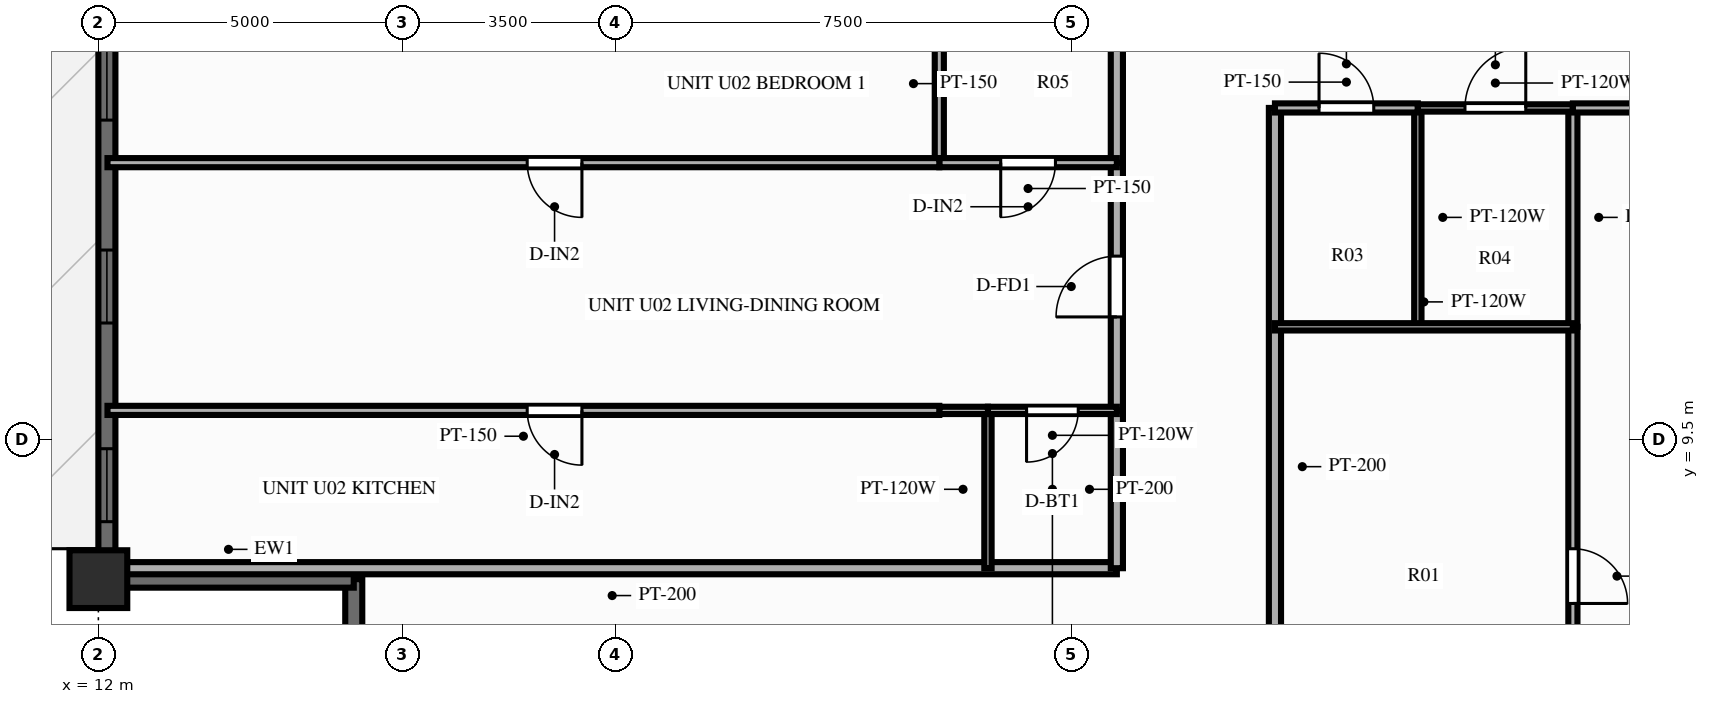
"""IFC4 building model, lengths in metres.
Left out: names, types, materials, properties, quantities, classifications, styles, units other than length and angle.
Written with IfcOpenShell. Run it as: python <this file> out.ifc"""

import sys

from ifc_helpers import new_model, si_unit, direction, frame, frame_2d, origin, origin_2d, place, context, subcontext, project, spatial, rectangle, extrude, source, transform, mapped, element, fill, save


model = new_model("IFC4")
c1 = context("Model", 3, precision=1e-05, world=origin(), true_north=direction((0.0, 1.0)))
c2 = subcontext(c1, "Body", "Model", "MODEL_VIEW")
j1 = project(units=[si_unit("LENGTHUNIT", "METRE"), si_unit("PLANEANGLEUNIT", "RADIAN")], contexts=[c1])
p1 = place(None, origin())
s1 = spatial("IfcSite", under=j1, at=p1, CompositionType="ELEMENT")
p2 = place(p1, origin())
s2 = spatial("IfcBuilding", under=s1, at=p2, CompositionType="ELEMENT")
p3 = place(p2, frame((0.0, 0.0, 138.75)))
s3 = spatial("IfcBuildingStorey", under=s2, at=p3, CompositionType="ELEMENT", Elevation=138.75)
m1 = source(origin(), c2, "Body", "SweptSolid", [
    extrude(rectangle(XDim=0.95, YDim=0.95, at=origin_2d()), origin(), (0.0, 0.0, 1.0), 3.0),
])
p4 = place(p3, frame((12.0, 7.2, 0.0), z_axis=(0.0, 0.0, 1.0), x_axis=(1.0, 0.0, 0.0)))
e1 = element("IfcColumn", 1, at=p4, inside=s3, PredefinedType="COLUMN", context=c2, shape_type="MappedRepresentation", body=[
    mapped(m1, transform((0.0, 0.0, 0.0), scale=1.0)),
])
p5 = place(p3, frame((12.14, 7.2, 0.0), z_axis=(0.0, 0.0, 1.0), x_axis=(0.0, 1.0, 0.0)))
e2 = element("IfcWall", 2, at=p5, inside=s3, PredefinedType="SOLIDWALL", context=c2, shape_type="SweptSolid", body=[
    extrude(rectangle(XDim=39.6, YDim=0.28, at=frame_2d((19.8, 0.0))), origin(), (0.0, 0.0, 1.0), 2.28),
])
p6 = place(p5, frame((0.945, 0.0, 0.25)))
e3 = element("IfcOpeningElement", 3, at=p6, cuts=e2, PredefinedType="OPENING", context=c2, shape_type="SweptSolid", body=[
    extrude(rectangle(XDim=1.2, YDim=1.5, at=frame_2d((0.6, 0.75))), frame((0.0, 0.152, 0.0), z_axis=(0.0, -1.0, 0.0), x_axis=(1.0, 0.0, 0.0)), (0.0, 0.0, 1.0), 0.304),
])
p7 = place(p5, frame((4.213, 0.0, 0.25)))
e4 = element("IfcOpeningElement", 4, at=p7, cuts=e2, PredefinedType="OPENING", context=c2, shape_type="SweptSolid", body=[
    extrude(rectangle(XDim=1.2, YDim=1.5, at=frame_2d((0.6, 0.75))), frame((0.0, 0.152, 0.0), z_axis=(0.0, -1.0, 0.0), x_axis=(1.0, 0.0, 0.0)), (0.0, 0.0, 1.0), 0.304),
])
p8 = place(p5, frame((7.55, 0.0, 0.25)))
e5 = element("IfcOpeningElement", 5, at=p8, cuts=e2, PredefinedType="OPENING", context=c2, shape_type="SweptSolid", body=[
    extrude(rectangle(XDim=1.2, YDim=1.5, at=frame_2d((0.6, 0.75))), frame((0.0, 0.152, 0.0), z_axis=(0.0, -1.0, 0.0), x_axis=(1.0, 0.0, 0.0)), (0.0, 0.0, 1.0), 0.304),
])
p9 = place(p5, frame((13.483, 0.0, 0.25)))
e6 = element("IfcOpeningElement", 6, at=p9, cuts=e2, PredefinedType="OPENING", context=c2, shape_type="SweptSolid", body=[
    extrude(rectangle(XDim=1.2, YDim=1.5, at=frame_2d((0.6, 0.75))), frame((0.0, 0.152, 0.0), z_axis=(0.0, -1.0, 0.0), x_axis=(1.0, 0.0, 0.0)), (0.0, 0.0, 1.0), 0.304),
])
p10 = place(p5, frame((16.82, 0.0, 0.25)))
e7 = element("IfcOpeningElement", 7, at=p10, cuts=e2, PredefinedType="OPENING", context=c2, shape_type="SweptSolid", body=[
    extrude(rectangle(XDim=1.2, YDim=1.5, at=frame_2d((0.6, 0.75))), frame((0.0, 0.152, 0.0), z_axis=(0.0, -1.0, 0.0), x_axis=(1.0, 0.0, 0.0)), (0.0, 0.0, 1.0), 0.304),
])
p11 = place(p5, frame((19.2, 0.0, 0.25)))
e8 = element("IfcOpeningElement", 8, at=p11, cuts=e2, PredefinedType="OPENING", context=c2, shape_type="SweptSolid", body=[
    extrude(rectangle(XDim=1.2, YDim=1.5, at=frame_2d((0.6, 0.75))), frame((0.0, 0.152, 0.0), z_axis=(0.0, -1.0, 0.0), x_axis=(1.0, 0.0, 0.0)), (0.0, 0.0, 1.0), 0.304),
])
p12 = place(p5, frame((21.578, 0.0, 0.25)))
e9 = element("IfcOpeningElement", 9, at=p12, cuts=e2, PredefinedType="OPENING", context=c2, shape_type="SweptSolid", body=[
    extrude(rectangle(XDim=1.2, YDim=1.5, at=frame_2d((0.6, 0.75))), frame((0.0, 0.152, 0.0), z_axis=(0.0, -1.0, 0.0), x_axis=(1.0, 0.0, 0.0)), (0.0, 0.0, 1.0), 0.304),
])
p13 = place(p5, frame((24.713, 0.0, 0.0)))
e10 = element("IfcOpeningElement", 10, at=p13, cuts=e2, PredefinedType="OPENING", context=c2, shape_type="SweptSolid", body=[
    extrude(rectangle(XDim=1.6, YDim=2.15, at=frame_2d((0.8, 1.075))), frame((0.0, 0.152, 0.0), z_axis=(0.0, -1.0, 0.0), x_axis=(1.0, 0.0, 0.0)), (0.0, 0.0, 1.0), 0.304),
])
p14 = place(p5, frame((29.305, 0.0, 0.25)))
e11 = element("IfcOpeningElement", 11, at=p14, cuts=e2, PredefinedType="OPENING", context=c2, shape_type="SweptSolid", body=[
    extrude(rectangle(XDim=0.7, YDim=1.5, at=frame_2d((0.35, 0.75))), frame((0.0, 0.152, 0.0), z_axis=(0.0, -1.0, 0.0), x_axis=(1.0, 0.0, 0.0)), (0.0, 0.0, 1.0), 0.304),
])
p15 = place(p5, frame((30.848, 0.0, 0.25)))
e12 = element("IfcOpeningElement", 12, at=p15, cuts=e2, PredefinedType="OPENING", context=c2, shape_type="SweptSolid", body=[
    extrude(rectangle(XDim=1.2, YDim=1.5, at=frame_2d((0.6, 0.75))), frame((0.0, 0.152, 0.0), z_axis=(0.0, -1.0, 0.0), x_axis=(1.0, 0.0, 0.0)), (0.0, 0.0, 1.0), 0.304),
])
p16 = place(p5, frame((34.183, 0.0, 0.25)))
e13 = element("IfcOpeningElement", 13, at=p16, cuts=e2, PredefinedType="OPENING", context=c2, shape_type="SweptSolid", body=[
    extrude(rectangle(XDim=1.2, YDim=1.5, at=frame_2d((0.6, 0.75))), frame((0.0, 0.152, 0.0), z_axis=(0.0, -1.0, 0.0), x_axis=(1.0, 0.0, 0.0)), (0.0, 0.0, 1.0), 0.304),
])
p17 = place(p5, frame((37.452, 0.0, 0.25)))
e14 = element("IfcOpeningElement", 14, at=p17, cuts=e2, PredefinedType="OPENING", context=c2, shape_type="SweptSolid", body=[
    extrude(rectangle(XDim=1.2, YDim=1.5, at=frame_2d((0.6, 0.75))), frame((0.0, 0.152, 0.0), z_axis=(0.0, -1.0, 0.0), x_axis=(1.0, 0.0, 0.0)), (0.0, 0.0, 1.0), 0.304),
])
for number, where, z_axis, x_axis in (
    (15, (16.2, 3.08, 0.0), (0.0, 0.0, 1.0), (0.0, 1.0, 0.0)),
    (16, (12.08, 7.2, 0.0), (0.0, 0.0, 1.0), (1.0, 0.0, 0.0)),
):
    element("IfcWall", number, at=place(p3, frame(where, z_axis=z_axis, x_axis=x_axis)), inside=s3, PredefinedType="SOLIDWALL", context=c2, shape_type="SweptSolid", body=[
        extrude(rectangle(XDim=4.12, YDim=0.28, at=frame_2d((2.06, 0.0))), origin(), (0.0, 0.0, 1.0), 2.28),
    ])
p18 = place(p3, frame((31.35, 14.95, 0.0), z_axis=(0.0, 0.0, 1.0), x_axis=(0.0, -1.0, 0.0)))
e17 = element("IfcWall", 17, at=p18, inside=s3, PredefinedType="PARTITIONING", context=c2, shape_type="SweptSolid", body=[
    extrude(rectangle(XDim=11.8, YDim=0.2, at=frame_2d((5.9, 0.0))), origin(), (0.0, 0.0, 1.0), 2.34),
])
p19 = place(p3, frame((33.7, 14.95, 0.0), z_axis=(0.0, 0.0, 1.0), x_axis=(0.0, -1.0, 0.0)))
e18 = element("IfcWall", 18, at=p19, inside=s3, PredefinedType="PARTITIONING", context=c2, shape_type="SweptSolid", body=[
    extrude(rectangle(XDim=3.6, YDim=0.12, at=frame_2d((1.8, 0.0))), origin(), (0.0, 0.0, 1.0), 2.79),
])
p20 = place(p3, frame((36.25, 14.95, 0.0), z_axis=(0.0, 0.0, 1.0), x_axis=(0.0, -1.0, 0.0)))
e19 = element("IfcWall", 19, at=p20, inside=s3, PredefinedType="PARTITIONING", context=c2, shape_type="SweptSolid", body=[
    extrude(rectangle(XDim=3.6, YDim=0.15, at=frame_2d((1.8, 0.0))), origin(), (0.0, 0.0, 1.0), 2.79),
])
p21 = place(p3, frame((36.25, 11.35, 0.0), z_axis=(0.0, 0.0, 1.0), x_axis=(0.0, -1.0, 0.0)))
e20 = element("IfcWall", 20, at=p21, inside=s3, PredefinedType="PARTITIONING", context=c2, shape_type="SweptSolid", body=[
    extrude(rectangle(XDim=8.2, YDim=0.15, at=frame_2d((4.1, 0.0))), origin(), (0.0, 0.0, 1.0), 2.79),
])
p22 = place(p21, frame((3.65, 0.0, 0.0)))
e21 = element("IfcOpeningElement", 21, at=p22, cuts=e20, PredefinedType="OPENING", context=c2, shape_type="SweptSolid", body=[
    extrude(rectangle(XDim=0.9, YDim=2.1, at=frame_2d((0.45, 1.05))), frame((0.0, 0.087, 0.0), z_axis=(0.0, -1.0, 0.0), x_axis=(1.0, 0.0, 0.0)), (0.0, 0.0, 1.0), 0.174),
])
p23 = place(p3, frame((31.35, 11.35, 0.0), z_axis=(0.0, 0.0, 1.0), x_axis=(1.0, 0.0, 0.0)))
e22 = element("IfcWall", 22, at=p23, inside=s3, PredefinedType="PARTITIONING", context=c2, shape_type="SweptSolid", body=[
    extrude(rectangle(XDim=4.9, YDim=0.12, at=frame_2d((2.45, 0.0))), origin(), (0.0, 0.0, 1.0), 2.79),
])
p24 = place(p3, frame((31.35, 14.95, 0.0), z_axis=(0.0, 0.0, 1.0), x_axis=(1.0, 0.0, 0.0)))
e23 = element("IfcWall", 23, at=p24, inside=s3, PredefinedType="PARTITIONING", context=c2, shape_type="SweptSolid", body=[
    extrude(rectangle(XDim=2.35, YDim=0.15, at=frame_2d((1.175, 0.0))), origin(), (0.0, 0.0, 1.0), 2.79),
])
p25 = place(p24, frame((0.725, 0.0, 0.0)))
e24 = element("IfcOpeningElement", 24, at=p25, cuts=e23, PredefinedType="OPENING", context=c2, shape_type="SweptSolid", body=[
    extrude(rectangle(XDim=0.9, YDim=2.1, at=frame_2d((0.45, 1.05))), frame((0.0, 0.087, 0.0), z_axis=(0.0, -1.0, 0.0), x_axis=(1.0, 0.0, 0.0)), (0.0, 0.0, 1.0), 0.174),
])
p26 = place(p3, frame((33.7, 14.95, 0.0), z_axis=(0.0, 0.0, 1.0), x_axis=(1.0, 0.0, 0.0)))
e25 = element("IfcWall", 25, at=p26, inside=s3, PredefinedType="PARTITIONING", context=c2, shape_type="SweptSolid", body=[
    extrude(rectangle(XDim=2.55, YDim=0.12, at=frame_2d((1.275, 0.0))), origin(), (0.0, 0.0, 1.0), 2.79),
])
p27 = place(p26, frame((0.775, 0.0, 0.0)))
e26 = element("IfcOpeningElement", 26, at=p27, cuts=e25, PredefinedType="OPENING", context=c2, shape_type="SweptSolid", body=[
    extrude(rectangle(XDim=1.0, YDim=2.1, at=frame_2d((0.5, 1.05))), frame((0.0, 0.072, 0.0), z_axis=(0.0, -1.0, 0.0), x_axis=(1.0, 0.0, 0.0)), (0.0, 0.0, 1.0), 0.144),
])
p28 = place(p3, frame((36.25, 14.95, 0.0), z_axis=(0.0, 0.0, 1.0), x_axis=(1.0, 0.0, 0.0)))
e27 = element("IfcWall", 27, at=p28, inside=s3, PredefinedType="PARTITIONING", context=c2, shape_type="SweptSolid", body=[
    extrude(rectangle(XDim=8.4, YDim=0.15, at=frame_2d((4.2, 0.0))), origin(), (0.0, 0.0, 1.0), 2.79),
])
p29 = place(p28, frame((3.367, 0.0, 0.0)))
e28 = element("IfcOpeningElement", 28, at=p29, cuts=e27, PredefinedType="OPENING", context=c2, shape_type="SweptSolid", body=[
    extrude(rectangle(XDim=1.1, YDim=2.15, at=frame_2d((0.55, 1.075))), frame((0.0, 0.087, 0.0), z_axis=(0.0, -1.0, 0.0), x_axis=(1.0, 0.0, 0.0)), (0.0, 0.0, 1.0), 0.174),
])
p30 = place(p3, frame((28.75, 7.38, 0.0), z_axis=(0.0, 0.0, 1.0), x_axis=(-1.0, 0.0, 0.0)))
e29 = element("IfcWall", 29, at=p30, inside=s3, PredefinedType="PARTITIONING", context=c2, shape_type="SweptSolid", body=[
    extrude(rectangle(XDim=16.6, YDim=0.2, at=frame_2d((8.3, 0.0))), origin(), (0.0, 0.0, 1.0), 2.79),
])
p31 = place(p3, frame((28.75, 7.38, 0.0), z_axis=(0.0, 0.0, 1.0), x_axis=(0.0, 1.0, 0.0)))
e30 = element("IfcWall", 30, at=p31, inside=s3, PredefinedType="PARTITIONING", context=c2, shape_type="SweptSolid", body=[
    extrude(rectangle(XDim=2.596, YDim=0.2, at=frame_2d((1.298, 0.0))), origin(), (0.0, 0.0, 1.0), 2.79),
])
p32 = place(p3, frame((28.75, 9.976, 0.0), z_axis=(0.0, 0.0, 1.0), x_axis=(0.0, 1.0, 0.0)))
e31 = element("IfcWall", 31, at=p32, inside=s3, PredefinedType="PARTITIONING", context=c2, shape_type="SweptSolid", body=[
    extrude(rectangle(XDim=4.074, YDim=0.2, at=frame_2d((2.037, 0.0))), origin(), (0.0, 0.0, 1.0), 2.79),
])
p33 = place(p32, frame((1.537, 0.0, 0.0)))
e32 = element("IfcOpeningElement", 32, at=p33, cuts=e31, PredefinedType="OPENING", context=c2, shape_type="SweptSolid", body=[
    extrude(rectangle(XDim=1.0, YDim=2.15, at=frame_2d((0.5, 1.075))), frame((0.0, 0.112, 0.0), z_axis=(0.0, -1.0, 0.0), x_axis=(1.0, 0.0, 0.0)), (0.0, 0.0, 1.0), 0.224),
])
p34 = place(p3, frame((28.75, 14.05, 0.0), z_axis=(0.0, 0.0, 1.0), x_axis=(0.0, 1.0, 0.0)))
e33 = element("IfcWall", 33, at=p34, inside=s3, PredefinedType="PARTITIONING", context=c2, shape_type="SweptSolid", body=[
    extrude(rectangle(XDim=2.6, YDim=0.2, at=frame_2d((1.3, 0.0))), origin(), (0.0, 0.0, 1.0), 2.79),
])
p35 = place(p3, frame((26.63, 7.38, 0.0), z_axis=(0.0, 0.0, 1.0), x_axis=(0.0, 1.0, 0.0)))
e34 = element("IfcWall", 34, at=p35, inside=s3, PredefinedType="PARTITIONING", context=c2, shape_type="SweptSolid", body=[
    extrude(rectangle(XDim=2.596, YDim=0.12, at=frame_2d((1.298, 0.0))), origin(), (0.0, 0.0, 1.0), 2.79),
])
p36 = place(p3, frame((25.83, 14.05, 0.0), z_axis=(0.0, 0.0, 1.0), x_axis=(0.0, 1.0, 0.0)))
e35 = element("IfcWall", 35, at=p36, inside=s3, PredefinedType="PARTITIONING", context=c2, shape_type="SweptSolid", body=[
    extrude(rectangle(XDim=2.6, YDim=0.15, at=frame_2d((1.3, 0.0))), origin(), (0.0, 0.0, 1.0), 2.79),
])
p37 = place(p3, frame((28.75, 9.976, 0.0), z_axis=(0.0, 0.0, 1.0), x_axis=(-1.0, 0.0, 0.0)))
e36 = element("IfcWall", 36, at=p37, inside=s3, PredefinedType="PARTITIONING", context=c2, shape_type="SweptSolid", body=[
    extrude(rectangle(XDim=2.12, YDim=0.12, at=frame_2d((1.06, 0.0))), origin(), (0.0, 0.0, 1.0), 2.79),
])
p38 = place(p37, frame((0.635, 0.0, 0.0)))
e37 = element("IfcOpeningElement", 37, at=p38, cuts=e36, PredefinedType="OPENING", context=c2, shape_type="SweptSolid", body=[
    extrude(rectangle(XDim=0.85, YDim=2.05, at=frame_2d((0.425, 1.025))), frame((0.0, 0.072, 0.0), z_axis=(0.0, -1.0, 0.0), x_axis=(1.0, 0.0, 0.0)), (0.0, 0.0, 1.0), 0.144),
])
p39 = place(p3, frame((26.63, 9.976, 0.0), z_axis=(0.0, 0.0, 1.0), x_axis=(-1.0, 0.0, 0.0)))
e38 = element("IfcWall", 38, at=p39, inside=s3, PredefinedType="PARTITIONING", context=c2, shape_type="SweptSolid", body=[
    extrude(rectangle(XDim=0.8, YDim=0.12, at=frame_2d((0.4, 0.0))), origin(), (0.0, 0.0, 1.0), 2.79),
])
p40 = place(p3, frame((25.83, 9.976, 0.0), z_axis=(0.0, 0.0, 1.0), x_axis=(-1.0, 0.0, 0.0)))
e39 = element("IfcWall", 39, at=p40, inside=s3, PredefinedType="PARTITIONING", context=c2, shape_type="SweptSolid", body=[
    extrude(rectangle(XDim=13.68, YDim=0.15, at=frame_2d((6.84, 0.0))), origin(), (0.0, 0.0, 1.0), 2.79),
])
p41 = place(p40, frame((5.877, 0.0, 0.0)))
e40 = element("IfcOpeningElement", 40, at=p41, cuts=e39, PredefinedType="OPENING", context=c2, shape_type="SweptSolid", body=[
    extrude(rectangle(XDim=0.9, YDim=2.1, at=frame_2d((0.45, 1.05))), frame((0.0, 0.087, 0.0), z_axis=(0.0, -1.0, 0.0), x_axis=(1.0, 0.0, 0.0)), (0.0, 0.0, 1.0), 0.174),
])
p42 = place(p3, frame((28.75, 14.05, 0.0), z_axis=(0.0, 0.0, 1.0), x_axis=(-1.0, 0.0, 0.0)))
e41 = element("IfcWall", 41, at=p42, inside=s3, PredefinedType="PARTITIONING", context=c2, shape_type="SweptSolid", body=[
    extrude(rectangle(XDim=2.92, YDim=0.15, at=frame_2d((1.46, 0.0))), origin(), (0.0, 0.0, 1.0), 2.79),
])
p43 = place(p42, frame((1.01, 0.0, 0.0)))
e42 = element("IfcOpeningElement", 42, at=p43, cuts=e41, PredefinedType="OPENING", context=c2, shape_type="SweptSolid", body=[
    extrude(rectangle(XDim=0.9, YDim=2.1, at=frame_2d((0.45, 1.05))), frame((0.0, 0.087, 0.0), z_axis=(0.0, -1.0, 0.0), x_axis=(1.0, 0.0, 0.0)), (0.0, 0.0, 1.0), 0.174),
])
p44 = place(p3, frame((25.83, 14.05, 0.0), z_axis=(0.0, 0.0, 1.0), x_axis=(-1.0, 0.0, 0.0)))
e43 = element("IfcWall", 43, at=p44, inside=s3, PredefinedType="PARTITIONING", context=c2, shape_type="SweptSolid", body=[
    extrude(rectangle(XDim=13.68, YDim=0.15, at=frame_2d((6.84, 0.0))), origin(), (0.0, 0.0, 1.0), 2.79),
])
p45 = place(p44, frame((5.877, 0.0, 0.0)))
e44 = element("IfcOpeningElement", 44, at=p45, cuts=e43, PredefinedType="OPENING", context=c2, shape_type="SweptSolid", body=[
    extrude(rectangle(XDim=0.9, YDim=2.1, at=frame_2d((0.45, 1.05))), frame((0.0, 0.087, 0.0), z_axis=(0.0, -1.0, 0.0), x_axis=(1.0, 0.0, 0.0)), (0.0, 0.0, 1.0), 0.174),
])
m2 = source(origin(), c2, "Body", "SweptSolid", [
    extrude(rectangle(XDim=1.2, YDim=1.5, at=frame_2d((0.6, 0.75))), frame((0.0, 0.03, 0.0), z_axis=(0.0, -1.0, 0.0), x_axis=(1.0, 0.0, 0.0)), (0.0, 0.0, 1.0), 0.06),
])
p46 = place(p6, origin())
e45 = element("IfcWindow", 45, at=p46, inside=s3, PartitioningType="SINGLE_PANEL", PredefinedType="WINDOW", context=c2, shape_type="MappedRepresentation", body=[
    mapped(m2, transform((0.0, 0.0, 0.0), scale=1.0)),
])
fill(e3, e45)
p47 = place(p7, origin())
e46 = element("IfcWindow", 46, at=p47, inside=s3, PartitioningType="SINGLE_PANEL", PredefinedType="WINDOW", context=c2, shape_type="MappedRepresentation", body=[
    mapped(m2, transform((0.0, 0.0, 0.0), scale=1.0)),
])
fill(e4, e46)
p48 = place(p8, origin())
e47 = element("IfcWindow", 47, at=p48, inside=s3, PartitioningType="SINGLE_PANEL", PredefinedType="WINDOW", context=c2, shape_type="MappedRepresentation", body=[
    mapped(m2, transform((0.0, 0.0, 0.0), scale=1.0)),
])
fill(e5, e47)
m3 = source(origin(), c2, "Body", "SweptSolid", [
    extrude(rectangle(XDim=0.9, YDim=2.1, at=frame_2d((0.45, 1.05))), frame((0.0, 0.025, 0.0), z_axis=(0.0, -1.0, 0.0), x_axis=(1.0, 0.0, 0.0)), (0.0, 0.0, 1.0), 0.05),
])
p49 = place(p22, origin())
e48 = element("IfcDoor", 48, at=p49, inside=s3, OperationType="SINGLE_SWING_RIGHT", PredefinedType="DOOR", context=c2, shape_type="MappedRepresentation", body=[
    mapped(m3, transform((0.0, 0.0, 0.0), scale=1.0)),
])
fill(e21, e48)
p50 = place(p25, origin())
e49 = element("IfcDoor", 49, at=p50, inside=s3, OperationType="SINGLE_SWING_LEFT", PredefinedType="DOOR", context=c2, shape_type="MappedRepresentation", body=[
    mapped(m3, transform((0.0, 0.0, 0.0), scale=1.0)),
])
fill(e24, e49)
m4 = source(origin(), c2, "Body", "SweptSolid", [
    extrude(rectangle(XDim=1.0, YDim=2.1, at=frame_2d((0.5, 1.05))), frame((0.0, 0.025, 0.0), z_axis=(0.0, -1.0, 0.0), x_axis=(1.0, 0.0, 0.0)), (0.0, 0.0, 1.0), 0.05),
])
p51 = place(p27, origin())
e50 = element("IfcDoor", 50, at=p51, inside=s3, OperationType="SINGLE_SWING_RIGHT", PredefinedType="DOOR", context=c2, shape_type="MappedRepresentation", body=[
    mapped(m4, transform((0.0, 0.0, 0.0), scale=1.0)),
])
fill(e26, e50)
m5 = source(origin(), c2, "Body", "SweptSolid", [
    extrude(rectangle(XDim=1.0, YDim=2.15, at=frame_2d((0.5, 1.075))), frame((0.0, 0.025, 0.0), z_axis=(0.0, -1.0, 0.0), x_axis=(1.0, 0.0, 0.0)), (0.0, 0.0, 1.0), 0.05),
])
p52 = place(p33, origin())
e51 = element("IfcDoor", 51, at=p52, inside=s3, OperationType="SINGLE_SWING_LEFT", PredefinedType="DOOR", context=c2, shape_type="MappedRepresentation", body=[
    mapped(m5, transform((0.0, 0.0, 0.0), scale=1.0)),
])
fill(e32, e51)
m6 = source(origin(), c2, "Body", "SweptSolid", [
    extrude(rectangle(XDim=0.85, YDim=2.05, at=frame_2d((0.425, 1.025))), frame((0.0, 0.025, 0.0), z_axis=(0.0, -1.0, 0.0), x_axis=(1.0, 0.0, 0.0)), (0.0, 0.0, 1.0), 0.05),
])
p53 = place(p38, origin())
e52 = element("IfcDoor", 52, at=p53, inside=s3, OperationType="SINGLE_SWING_RIGHT", PredefinedType="DOOR", context=c2, shape_type="MappedRepresentation", body=[
    mapped(m6, transform((0.0, 0.0, 0.0), scale=1.0)),
])
fill(e37, e52)
p54 = place(p41, origin())
e53 = element("IfcDoor", 53, at=p54, inside=s3, OperationType="SINGLE_SWING_LEFT", PredefinedType="DOOR", context=c2, shape_type="MappedRepresentation", body=[
    mapped(m3, transform((0.0, 0.0, 0.0), scale=1.0)),
])
fill(e40, e53)
p55 = place(p43, origin())
e54 = element("IfcDoor", 54, at=p55, inside=s3, OperationType="SINGLE_SWING_RIGHT", PredefinedType="DOOR", context=c2, shape_type="MappedRepresentation", body=[
    mapped(m3, transform((0.0, 0.0, 0.0), scale=1.0)),
])
fill(e42, e54)
p56 = place(p45, origin())
e55 = element("IfcDoor", 55, at=p56, inside=s3, OperationType="SINGLE_SWING_LEFT", PredefinedType="DOOR", context=c2, shape_type="MappedRepresentation", body=[
    mapped(m3, transform((0.0, 0.0, 0.0), scale=1.0)),
])
fill(e44, e55)
save(model, sys.argv[1])
